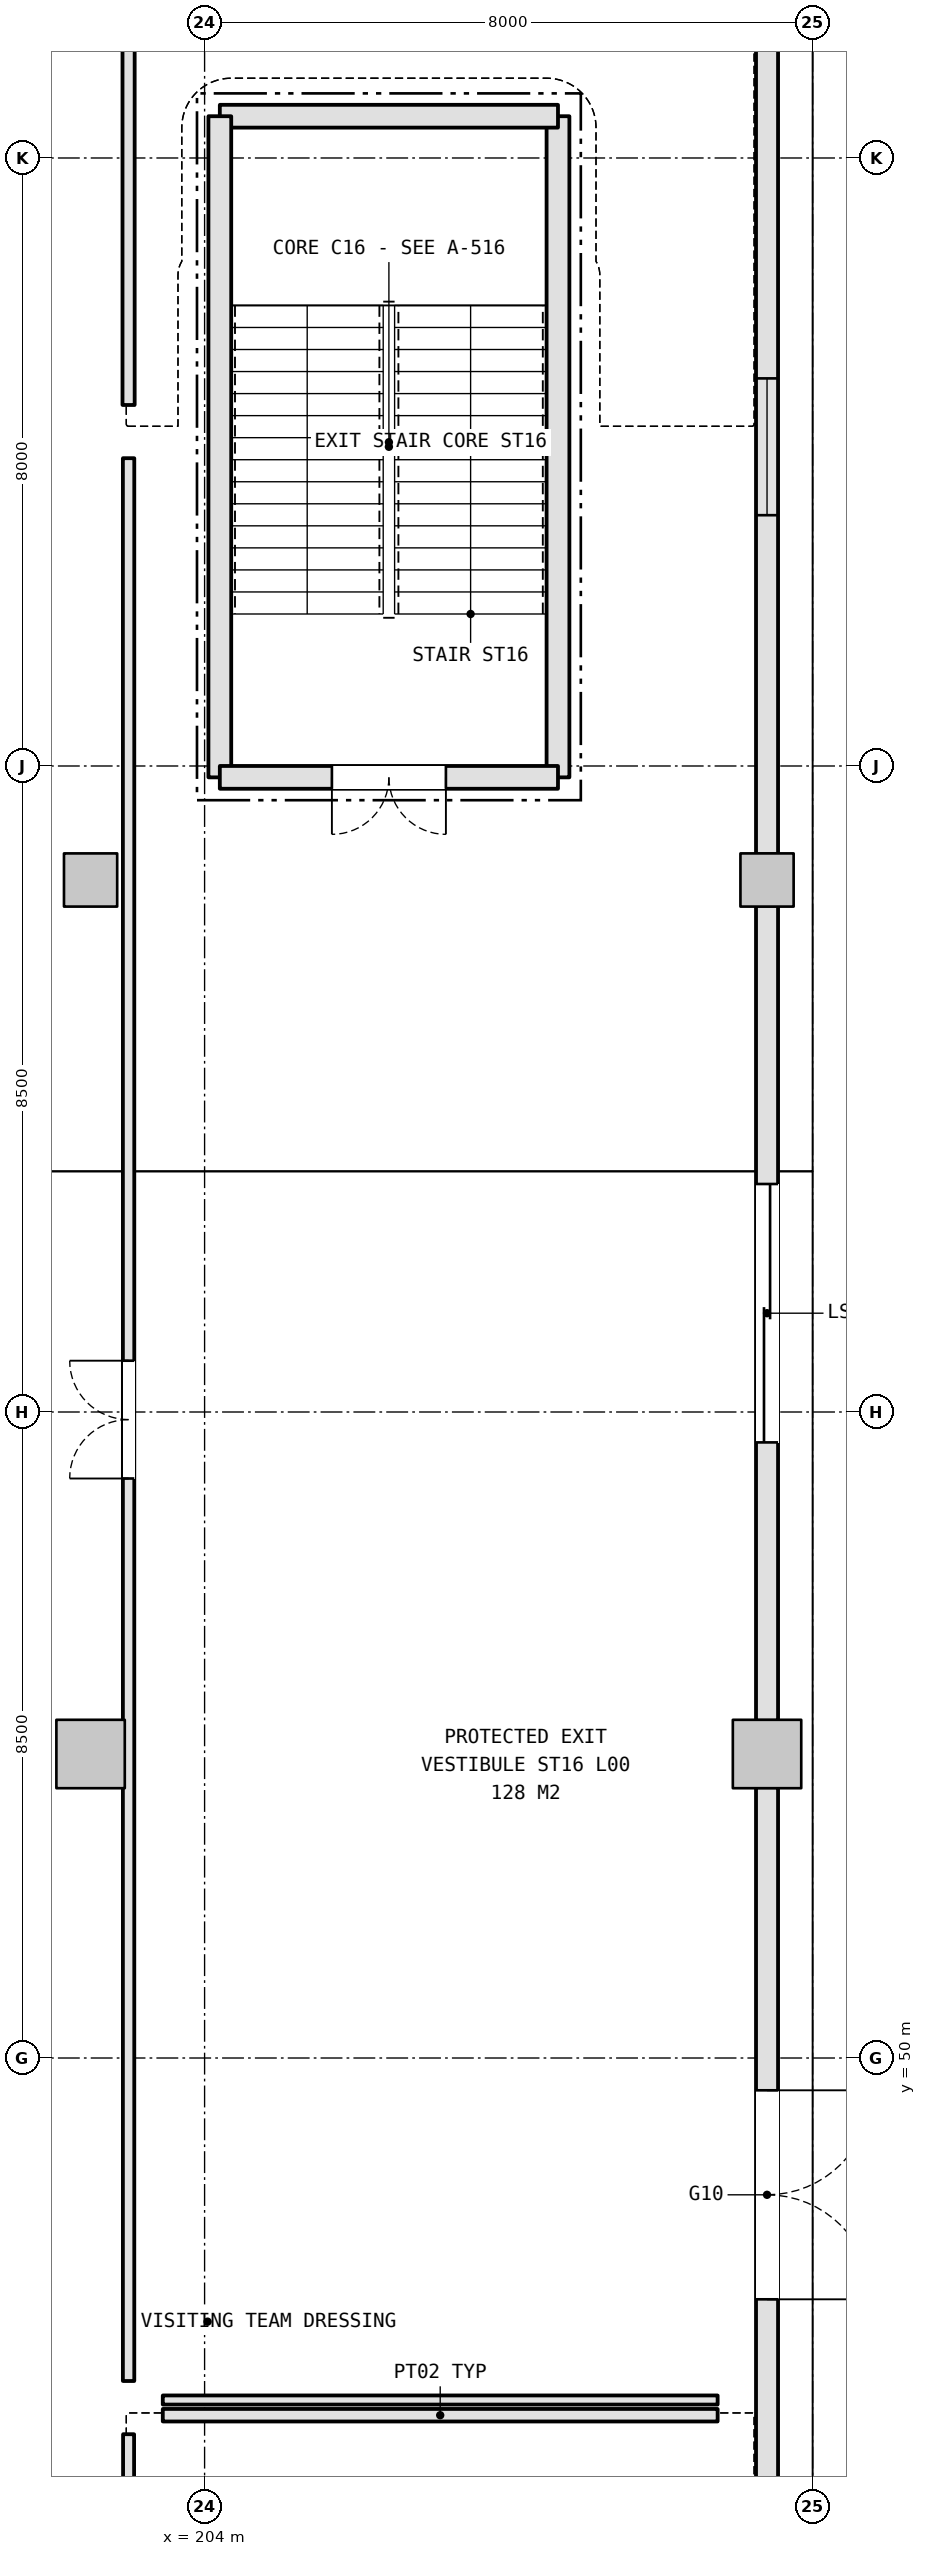
"""IFC4 building model, lengths in metres.
Left out: names, types, materials, properties, quantities, classifications, styles, units other than length and angle.
Written with IfcOpenShell. Run it as: python <this file> out.ifc"""

import sys

from ifc_helpers import new_model, si_unit, direction, frame, frame_2d, origin, origin_2d, place, context, subcontext, project, spatial, rectangle, extrude, element, fill, save


model = new_model("IFC4")
c1 = context("Model", 3, precision=1e-05, world=origin(), true_north=direction((0.0, 1.0)))
c2 = subcontext(c1, "Body", "Model", "MODEL_VIEW")
j1 = project(units=[si_unit("LENGTHUNIT", "METRE"), si_unit("PLANEANGLEUNIT", "RADIAN")], contexts=[c1])
p1 = place(None, origin())
s1 = spatial("IfcSite", under=j1, at=p1, CompositionType="ELEMENT")
p2 = place(p1, origin())
s2 = spatial("IfcBuilding", under=s1, at=p2, CompositionType="ELEMENT")
p3 = place(p2, origin())
s3 = spatial("IfcBuildingStorey", under=s2, at=p3, CompositionType="ELEMENT", Elevation=0.0)
p4 = place(p3, frame((202.5, 54.0, 0.0), z_axis=(0.0, 0.0, 1.0), x_axis=(1.0, 0.0, 0.0)))
e1 = element("IfcColumn", 1, at=p4, inside=s3, PredefinedType="COLUMN", context=c2, shape_type="SweptSolid", body=[
    extrude(rectangle(XDim=0.9, YDim=0.9, at=origin_2d()), origin(), (0.0, 0.0, 1.0), 5.4),
])
p5 = place(p3, frame((202.5, 65.5, 0.0), z_axis=(0.0, 0.0, 1.0), x_axis=(1.0, 0.0, 0.0)))
e2 = element("IfcColumn", 2, at=p5, inside=s3, PredefinedType="COLUMN", context=c2, shape_type="SweptSolid", body=[
    extrude(rectangle(XDim=0.7, YDim=0.7, at=origin_2d()), origin(), (0.0, 0.0, 1.0), 5.4),
])
p6 = place(p3, frame((211.4, 54.0, 0.0), z_axis=(0.0, 0.0, 1.0), x_axis=(1.0, 0.0, 0.0)))
e3 = element("IfcColumn", 3, at=p6, inside=s3, PredefinedType="COLUMN", context=c2, shape_type="SweptSolid", body=[
    extrude(rectangle(XDim=0.9, YDim=0.9, at=origin_2d()), origin(), (0.0, 0.0, 1.0), 5.4),
])
p7 = place(p3, frame((211.4, 65.5, 0.0), z_axis=(0.0, 0.0, 1.0), x_axis=(1.0, 0.0, 0.0)))
e4 = element("IfcColumn", 4, at=p7, inside=s3, PredefinedType="COLUMN", context=c2, shape_type="SweptSolid", body=[
    extrude(rectangle(XDim=0.7, YDim=0.7, at=origin_2d()), origin(), (0.0, 0.0, 1.0), 5.4),
])
p8 = place(p3, frame((211.4, 42.838, 0.0), z_axis=(0.0, 0.0, 1.0), x_axis=(0.0, 1.0, 0.0)))
e5 = element("IfcWall", 5, at=p8, inside=s3, PredefinedType="SOLIDWALL", context=c2, shape_type="SweptSolid", body=[
    extrude(rectangle(XDim=10.724, YDim=0.29, at=frame_2d((5.362, 0.0))), origin(), (0.0, 0.0, 1.0), 4.475),
])
p9 = place(p8, frame((3.987, 0.0, 0.0)))
e6 = element("IfcOpeningElement", 6, at=p9, cuts=e5, PredefinedType="OPENING", context=c2, shape_type="SweptSolid", body=[
    extrude(rectangle(XDim=2.75, YDim=2.4, at=frame_2d((1.375, 1.2))), frame((0.0, 0.155, 0.0), z_axis=(0.0, -1.0, 0.0), x_axis=(1.0, 0.0, 0.0)), (0.0, 0.0, 1.0), 0.31),
])
p10 = place(p3, frame((211.4, 54.438, 0.0), z_axis=(0.0, 0.0, 1.0), x_axis=(0.0, 1.0, 0.0)))
e7 = element("IfcWall", 7, at=p10, inside=s3, PredefinedType="SOLIDWALL", context=c2, shape_type="SweptSolid", body=[
    extrude(rectangle(XDim=10.724, YDim=0.29, at=frame_2d((5.362, 0.0))), origin(), (0.0, 0.0, 1.0), 4.475),
])
p11 = place(p10, frame((3.662, 0.0, 0.0)))
e8 = element("IfcOpeningElement", 8, at=p11, cuts=e7, PredefinedType="OPENING", context=c2, shape_type="SweptSolid", body=[
    extrude(rectangle(XDim=3.4, YDim=3.8, at=frame_2d((1.7, 1.9))), frame((0.0, 0.155, 0.0), z_axis=(0.0, -1.0, 0.0), x_axis=(1.0, 0.0, 0.0)), (0.0, 0.0, 1.0), 0.31),
])
p12 = place(p3, frame((211.4, 65.838, 0.0), z_axis=(0.0, 0.0, 1.0), x_axis=(0.0, 1.0, 0.0)))
e9 = element("IfcWall", 9, at=p12, inside=s3, PredefinedType="SOLIDWALL", context=c2, shape_type="SweptSolid", body=[
    extrude(rectangle(XDim=10.724, YDim=0.29, at=frame_2d((5.362, 0.0))), origin(), (0.0, 0.0, 1.0), 4.475),
])
p13 = place(p12, frame((4.462, 0.0, 1.2)))
e10 = element("IfcOpeningElement", 10, at=p13, cuts=e9, PredefinedType="OPENING", context=c2, shape_type="SweptSolid", body=[
    extrude(rectangle(XDim=1.8, YDim=1.6, at=frame_2d((0.9, 0.8))), frame((0.0, 0.155, 0.0), z_axis=(0.0, -1.0, 0.0), x_axis=(1.0, 0.0, 0.0)), (0.0, 0.0, 1.0), 0.31),
])
p14 = place(p3, frame((208.65, 66.85, 0.0), z_axis=(0.0, 0.0, 1.0), x_axis=(0.0, 1.0, 0.0)))
e11 = element("IfcWall", 11, at=p14, inside=s3, PredefinedType="SHEAR", context=c2, shape_type="SweptSolid", body=[
    extrude(rectangle(XDim=8.699, YDim=0.3, at=frame_2d((4.35, 0.0))), origin(), (0.0, 0.0, 1.0), 5.14),
])
p15 = place(p3, frame((208.65, 75.55, 0.0), z_axis=(0.0, 0.0, 1.0), x_axis=(-1.0, 0.0, 0.0)))
e12 = element("IfcWall", 12, at=p15, inside=s3, PredefinedType="SHEAR", context=c2, shape_type="SweptSolid", body=[
    extrude(rectangle(XDim=4.449, YDim=0.3, at=frame_2d((2.225, 0.0))), origin(), (0.0, 0.0, 1.0), 5.14),
])
p16 = place(p3, frame((204.2, 75.55, 0.0), z_axis=(0.0, 0.0, 1.0), x_axis=(0.0, -1.0, 0.0)))
e13 = element("IfcWall", 13, at=p16, inside=s3, PredefinedType="SHEAR", context=c2, shape_type="SweptSolid", body=[
    extrude(rectangle(XDim=8.699, YDim=0.3, at=frame_2d((4.35, 0.0))), origin(), (0.0, 0.0, 1.0), 5.14),
])
p17 = place(p3, frame((204.2, 66.85, 0.0), z_axis=(0.0, 0.0, 1.0), x_axis=(1.0, 0.0, 0.0)))
e14 = element("IfcWall", 14, at=p17, inside=s3, PredefinedType="SHEAR", context=c2, shape_type="SweptSolid", body=[
    extrude(rectangle(XDim=4.449, YDim=0.3, at=frame_2d((2.225, 0.0))), origin(), (0.0, 0.0, 1.0), 5.14),
])
p18 = place(p17, frame((1.475, 0.0, 0.0)))
e15 = element("IfcOpeningElement", 15, at=p18, cuts=e14, PredefinedType="OPENING", context=c2, shape_type="SweptSolid", body=[
    extrude(rectangle(XDim=1.5, YDim=2.2, at=frame_2d((0.75, 1.1))), frame((0.0, 0.16, 0.0), z_axis=(0.0, -1.0, 0.0), x_axis=(1.0, 0.0, 0.0)), (0.0, 0.0, 1.0), 0.32),
])
p19 = place(p3, frame((203.0, 19.75, 0.0), z_axis=(0.0, 0.0, 1.0), x_axis=(0.0, 1.0, 0.0)))
e16 = element("IfcWall", 16, at=p19, inside=s3, PredefinedType="PARTITIONING", context=c2, shape_type="SweptSolid", body=[
    extrude(rectangle(XDim=25.3, YDim=0.145, at=frame_2d((12.65, 0.0))), origin(), (0.0, 0.0, 1.0), 4.625),
])
p20 = place(p19, frame((12.11, 0.0, 0.0)))
e17 = element("IfcOpeningElement", 17, at=p20, cuts=e16, PredefinedType="OPENING", context=c2, shape_type="SweptSolid", body=[
    extrude(rectangle(XDim=1.08, YDim=2.25, at=frame_2d((0.54, 1.125))), frame((0.0, 0.083, 0.0), z_axis=(0.0, -1.0, 0.0), x_axis=(1.0, 0.0, 0.0)), (0.0, 0.0, 1.0), 0.165),
])
p21 = place(p3, frame((203.45, 45.3, 0.0), z_axis=(0.0, 0.0, 1.0), x_axis=(1.0, 0.0, 0.0)))
e18 = element("IfcWall", 18, at=p21, inside=s3, PredefinedType="PARTITIONING", context=c2, shape_type="SweptSolid", body=[
    extrude(rectangle(XDim=7.3, YDim=0.165, at=frame_2d((3.65, 0.0))), origin(), (0.0, 0.0, 1.0), 5.12),
])
p22 = place(p3, frame((203.0, 45.75, 0.0), z_axis=(0.0, 0.0, 1.0), x_axis=(0.0, 1.0, 0.0)))
e19 = element("IfcWall", 19, at=p22, inside=s3, PredefinedType="PARTITIONING", context=c2, shape_type="SweptSolid", body=[
    extrude(rectangle(XDim=25.3, YDim=0.15, at=frame_2d((12.65, 0.0))), origin(), (0.0, 0.0, 1.0), 4.625),
])
p23 = place(p22, frame((11.875, 0.0, 0.0)))
e20 = element("IfcOpeningElement", 20, at=p23, cuts=e19, PredefinedType="OPENING", context=c2, shape_type="SweptSolid", body=[
    extrude(rectangle(XDim=1.55, YDim=2.15, at=frame_2d((0.775, 1.075))), frame((0.0, 0.085, 0.0), z_axis=(0.0, -1.0, 0.0), x_axis=(1.0, 0.0, 0.0)), (0.0, 0.0, 1.0), 0.17),
])
p24 = place(p3, frame((210.75, 45.5, 0.0), z_axis=(0.0, 0.0, 1.0), x_axis=(-1.0, 0.0, 0.0)))
e21 = element("IfcWall", 21, at=p24, inside=s3, PredefinedType="PARTITIONING", context=c2, shape_type="SweptSolid", body=[
    extrude(rectangle(XDim=7.3, YDim=0.12, at=frame_2d((3.65, 0.0))), origin(), (0.0, 0.0, 1.0), 5.12),
])
p25 = place(p3, frame((203.0, 71.75, 0.0), z_axis=(0.0, 0.0, 1.0), x_axis=(0.0, 1.0, 0.0)))
e22 = element("IfcWall", 22, at=p25, inside=s3, PredefinedType="PARTITIONING", context=c2, shape_type="SweptSolid", body=[
    extrude(rectangle(XDim=27.3, YDim=0.16, at=frame_2d((13.65, 0.0))), origin(), (0.0, 0.0, 1.0), 4.625),
])
p26 = place(p25, frame((13.075, 0.0, 0.0)))
e23 = element("IfcOpeningElement", 23, at=p26, cuts=e22, PredefinedType="OPENING", context=c2, shape_type="SweptSolid", body=[
    extrude(rectangle(XDim=1.15, YDim=2.2, at=frame_2d((0.575, 1.1))), frame((0.0, 0.09, 0.0), z_axis=(0.0, -1.0, 0.0), x_axis=(1.0, 0.0, 0.0)), (0.0, 0.0, 1.0), 0.18),
])
p27 = place(p9, frame((2.75, 0.0, 0.0), z_axis=(0.0, 0.0, 1.0), x_axis=(-1.0, 0.0, 0.0)))
e24 = element("IfcDoor", 24, at=p27, inside=s3, OperationType="DOUBLE_DOOR_SINGLE_SWING", PredefinedType="DOOR", context=c2, shape_type="SweptSolid", body=[
    extrude(rectangle(XDim=2.75, YDim=2.4, at=frame_2d((1.375, 1.2))), frame((0.0, 0.025, 0.0), z_axis=(0.0, -1.0, 0.0), x_axis=(1.0, 0.0, 0.0)), (0.0, 0.0, 1.0), 0.05),
])
fill(e6, e24)
p28 = place(p11, frame((3.4, 0.0, 0.0), z_axis=(0.0, 0.0, 1.0), x_axis=(-1.0, 0.0, 0.0)))
e25 = element("IfcDoor", 25, at=p28, inside=s3, OperationType="ROLLINGUP", PredefinedType="DOOR", context=c2, shape_type="SweptSolid", body=[
    extrude(rectangle(XDim=3.4, YDim=3.8, at=frame_2d((1.7, 1.9))), frame((0.0, 0.025, 0.0), z_axis=(0.0, -1.0, 0.0), x_axis=(1.0, 0.0, 0.0)), (0.0, 0.0, 1.0), 0.05),
])
fill(e8, e25)
p29 = place(p13, origin())
e26 = element("IfcWindow", 26, at=p29, inside=s3, PartitioningType="SINGLE_PANEL", PredefinedType="WINDOW", context=c2, shape_type="SweptSolid", body=[
    extrude(rectangle(XDim=1.8, YDim=1.6, at=frame_2d((0.9, 0.8))), frame((0.0, 0.03, 0.0), z_axis=(0.0, -1.0, 0.0), x_axis=(1.0, 0.0, 0.0)), (0.0, 0.0, 1.0), 0.06),
])
fill(e10, e26)
p30 = place(p18, frame((1.5, 0.0, 0.0), z_axis=(0.0, 0.0, 1.0), x_axis=(-1.0, 0.0, 0.0)))
e27 = element("IfcDoor", 27, at=p30, inside=s3, OperationType="DOUBLE_DOOR_SINGLE_SWING", PredefinedType="DOOR", context=c2, shape_type="SweptSolid", body=[
    extrude(rectangle(XDim=1.5, YDim=2.2, at=frame_2d((0.75, 1.1))), frame((0.0, 0.025, 0.0), z_axis=(0.0, -1.0, 0.0), x_axis=(1.0, 0.0, 0.0)), (0.0, 0.0, 1.0), 0.05),
])
fill(e15, e27)
p31 = place(p23, origin())
e28 = element("IfcDoor", 28, at=p31, inside=s3, OperationType="DOUBLE_DOOR_SINGLE_SWING", PredefinedType="DOOR", context=c2, shape_type="SweptSolid", body=[
    extrude(rectangle(XDim=1.55, YDim=2.15, at=frame_2d((0.775, 1.075))), frame((0.0, 0.025, 0.0), z_axis=(0.0, -1.0, 0.0), x_axis=(1.0, 0.0, 0.0)), (0.0, 0.0, 1.0), 0.05),
])
fill(e20, e28)
save(model, sys.argv[1])
